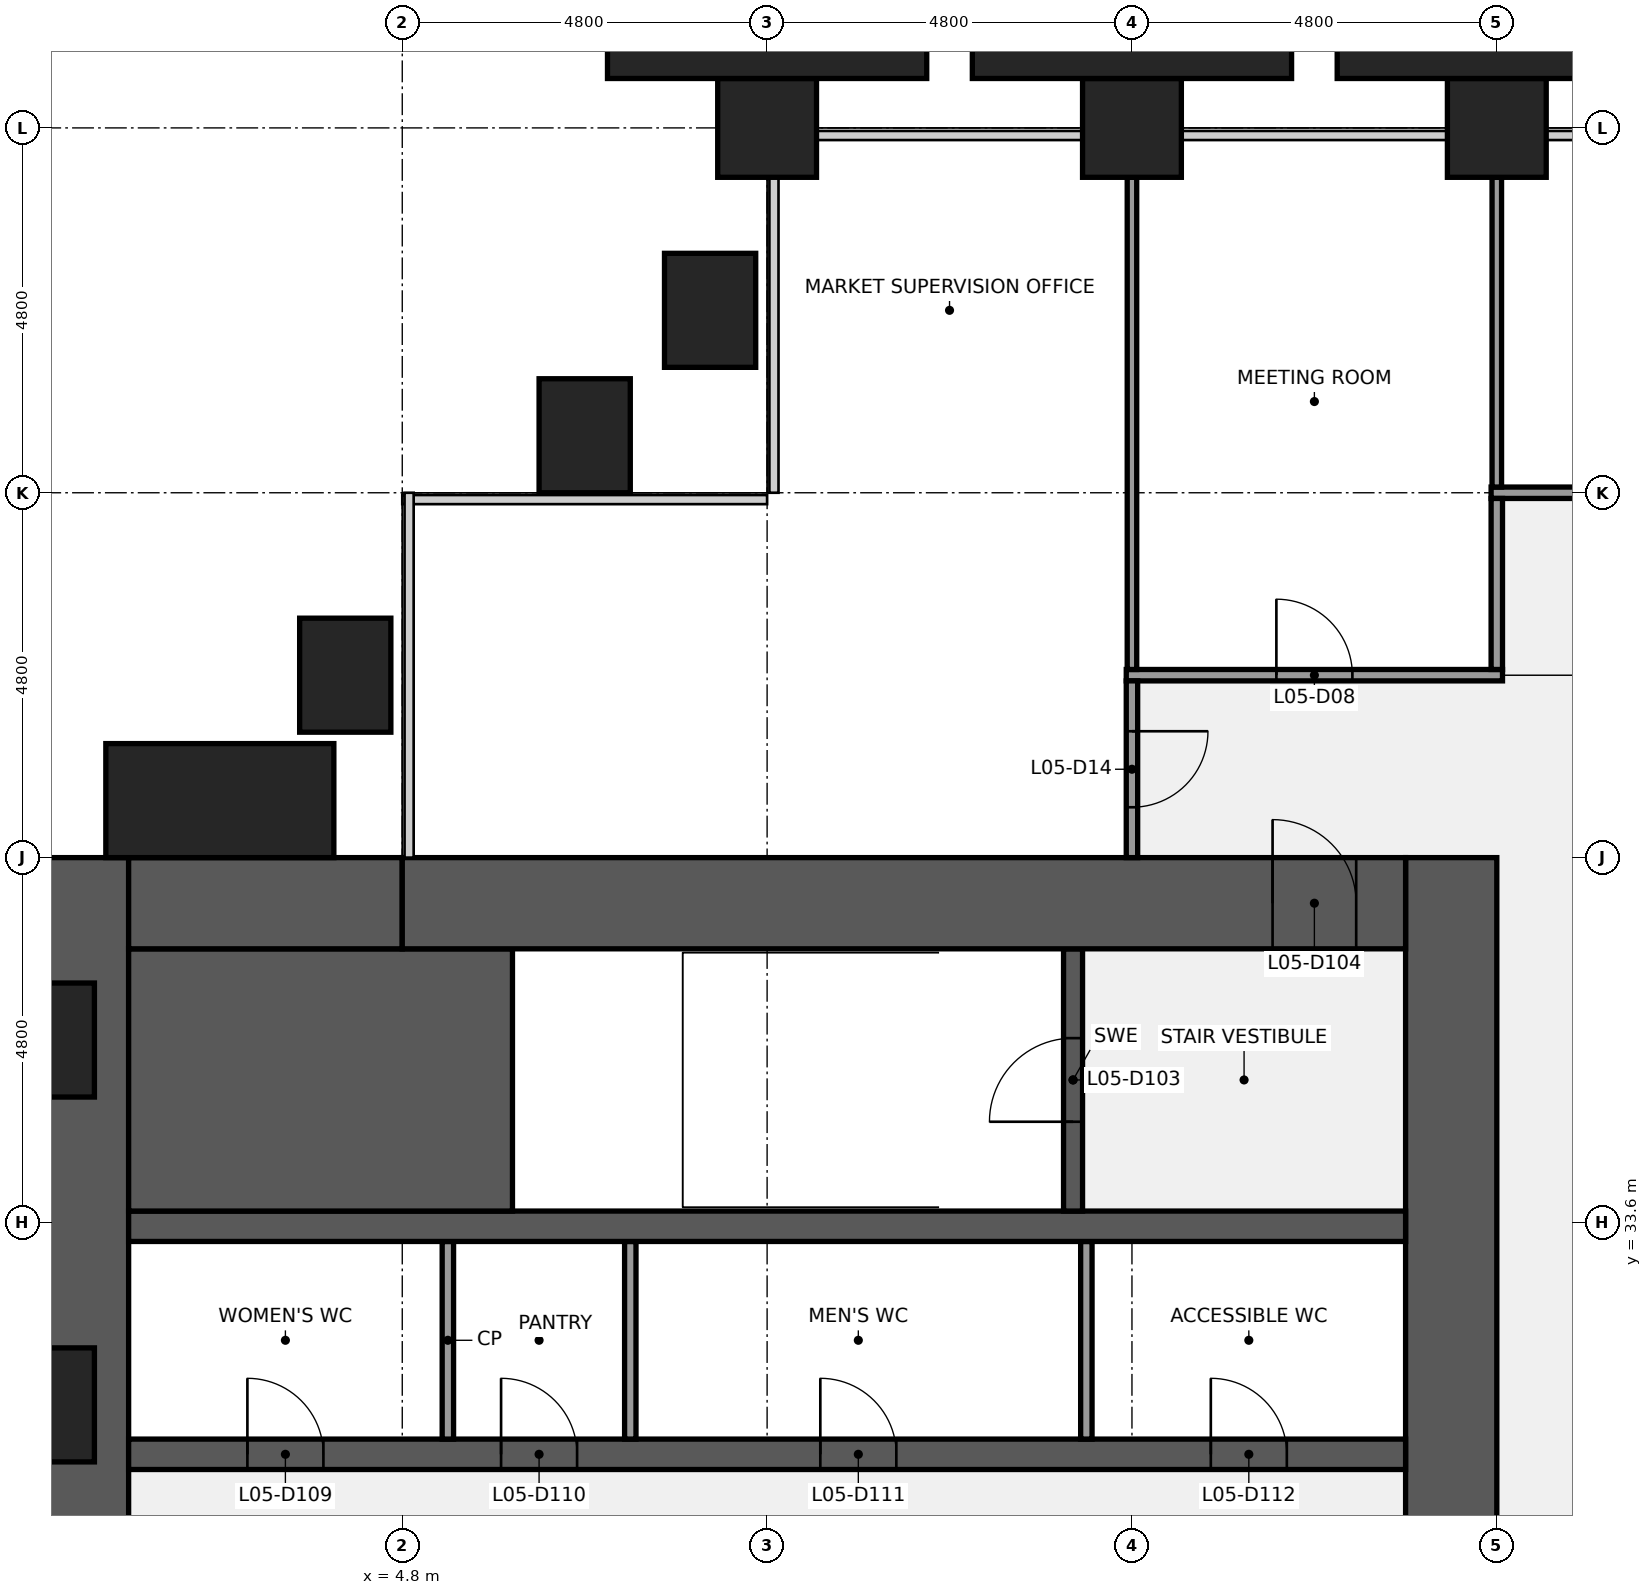
"""IFC4 building model, lengths in metres.
Left out: names, types, materials, properties, quantities, classifications, styles, units other than length and angle.
Written with IfcOpenShell. Run it as: python <this file> out.ifc"""

import sys

from ifc_helpers import new_model, si_unit, direction, frame, frame_2d, origin, origin_2d, place, context, subcontext, project, spatial, rectangle, extrude, element, fill, save


model = new_model("IFC4")
c1 = context("Model", 3, precision=1e-05, world=origin(), true_north=direction((0.0, 1.0)))
c2 = subcontext(c1, "Body", "Model", "MODEL_VIEW")
j1 = project(units=[si_unit("LENGTHUNIT", "METRE"), si_unit("PLANEANGLEUNIT", "RADIAN")], contexts=[c1])
p1 = place(None, origin())
s1 = spatial("IfcSite", under=j1, at=p1, CompositionType="ELEMENT")
p2 = place(p1, origin())
s2 = spatial("IfcBuilding", under=s1, at=p2, CompositionType="ELEMENT")
p3 = place(p2, frame((0.0, 0.0, 30.2)))
s3 = spatial("IfcBuildingStorey", under=s2, at=p3, CompositionType="ELEMENT", Elevation=30.2)
for number, where, z_axis, x_axis in (
    (1, (9.6, 48.0, 0.0), (0.0, 0.0, 1.0), (1.0, 0.0, 0.0)),
    (2, (14.4, 48.0, 0.0), (0.0, 0.0, 1.0), (1.0, 0.0, 0.0)),
    (3, (19.2, 48.0, 0.0), (0.0, 0.0, 1.0), (1.0, 0.0, 0.0)),
):
    element("IfcColumn", number, at=place(p3, frame(where, z_axis=z_axis, x_axis=x_axis)), inside=s3, PredefinedType="COLUMN", context=c2, shape_type="SweptSolid", body=[
        extrude(rectangle(XDim=1.3, YDim=1.3, at=origin_2d()), origin(), (0.0, 0.0, 1.0), 4.4),
    ])
p4 = place(p3, frame((0.6, 9.6, 0.0), z_axis=(0.0, 0.0, 1.0), x_axis=(0.0, 1.0, 0.0)))
e4 = element("IfcWall", 4, at=p4, inside=s3, PredefinedType="SHEAR", context=c2, shape_type="SweptSolid", body=[
    extrude(rectangle(XDim=28.8, YDim=1.2, at=frame_2d((14.4, 0.0))), origin(), (0.0, 0.0, 1.0), 4.24),
])
p5 = place(p4, frame((8.85, 0.0, 0.9)))
e5 = element("IfcOpeningElement", 5, at=p5, cuts=e4, PredefinedType="OPENING", context=c2, shape_type="SweptSolid", body=[
    extrude(rectangle(XDim=1.5, YDim=1.5, at=frame_2d((0.75, 0.75))), frame((0.0, 0.61, 0.0), z_axis=(0.0, -1.0, 0.0), x_axis=(1.0, 0.0, 0.0)), (0.0, 0.0, 1.0), 1.22),
])
p6 = place(p4, frame((18.45, 0.0, 0.9)))
e6 = element("IfcOpeningElement", 6, at=p6, cuts=e4, PredefinedType="OPENING", context=c2, shape_type="SweptSolid", body=[
    extrude(rectangle(XDim=1.5, YDim=1.5, at=frame_2d((0.75, 0.75))), frame((0.0, 0.61, 0.0), z_axis=(0.0, -1.0, 0.0), x_axis=(1.0, 0.0, 0.0)), (0.0, 0.0, 1.0), 1.22),
])
p7 = place(p3, frame((18.6, 38.4, 0.0), z_axis=(0.0, 0.0, 1.0), x_axis=(0.0, -1.0, 0.0)))
e7 = element("IfcWall", 7, at=p7, inside=s3, PredefinedType="SHEAR", context=c2, shape_type="SweptSolid", body=[
    extrude(rectangle(XDim=28.8, YDim=1.2, at=frame_2d((14.4, 0.0))), origin(), (0.0, 0.0, 1.0), 4.24),
])
p8 = place(p7, frame((18.3, 0.0, 0.0)))
e8 = element("IfcOpeningElement", 8, at=p8, cuts=e7, PredefinedType="OPENING", context=c2, shape_type="SweptSolid", body=[
    extrude(rectangle(XDim=1.8, YDim=2.1, at=frame_2d((0.9, 1.05))), frame((0.0, 0.61, 0.0), z_axis=(0.0, -1.0, 0.0), x_axis=(1.0, 0.0, 0.0)), (0.0, 0.0, 1.0), 1.22),
])
p9 = place(p7, frame((8.7, 0.0, 0.0)))
e9 = element("IfcOpeningElement", 9, at=p9, cuts=e7, PredefinedType="OPENING", context=c2, shape_type="SweptSolid", body=[
    extrude(rectangle(XDim=1.8, YDim=2.1, at=frame_2d((0.9, 1.05))), frame((0.0, 0.61, 0.0), z_axis=(0.0, -1.0, 0.0), x_axis=(1.0, 0.0, 0.0)), (0.0, 0.0, 1.0), 1.22),
])
p10 = place(p3, frame((1.2, 30.55, 0.0), z_axis=(0.0, 0.0, 1.0), x_axis=(1.0, 0.0, 0.0)))
e10 = element("IfcWall", 10, at=p10, inside=s3, PredefinedType="SHEAR", context=c2, shape_type="SweptSolid", body=[
    extrude(rectangle(XDim=16.8, YDim=0.4, at=frame_2d((8.4, 0.0))), origin(), (0.0, 0.0, 1.0), 4.24),
])
p11 = place(p10, frame((1.562, 0.0, 0.0)))
e11 = element("IfcOpeningElement", 11, at=p11, cuts=e10, PredefinedType="OPENING", context=c2, shape_type="SweptSolid", body=[
    extrude(rectangle(XDim=1.0, YDim=2.1, at=frame_2d((0.5, 1.05))), frame((0.0, 0.21, 0.0), z_axis=(0.0, -1.0, 0.0), x_axis=(1.0, 0.0, 0.0)), (0.0, 0.0, 1.0), 0.42),
])
p12 = place(p10, frame((4.9, 0.0, 0.0)))
e12 = element("IfcOpeningElement", 12, at=p12, cuts=e10, PredefinedType="OPENING", context=c2, shape_type="SweptSolid", body=[
    extrude(rectangle(XDim=1.0, YDim=2.1, at=frame_2d((0.5, 1.05))), frame((0.0, 0.21, 0.0), z_axis=(0.0, -1.0, 0.0), x_axis=(1.0, 0.0, 0.0)), (0.0, 0.0, 1.0), 0.42),
])
p13 = place(p10, frame((9.1, 0.0, 0.0)))
e13 = element("IfcOpeningElement", 13, at=p13, cuts=e10, PredefinedType="OPENING", context=c2, shape_type="SweptSolid", body=[
    extrude(rectangle(XDim=1.0, YDim=2.1, at=frame_2d((0.5, 1.05))), frame((0.0, 0.21, 0.0), z_axis=(0.0, -1.0, 0.0), x_axis=(1.0, 0.0, 0.0)), (0.0, 0.0, 1.0), 0.42),
])
p14 = place(p10, frame((14.238, 0.0, 0.0)))
e14 = element("IfcOpeningElement", 14, at=p14, cuts=e10, PredefinedType="OPENING", context=c2, shape_type="SweptSolid", body=[
    extrude(rectangle(XDim=1.0, YDim=2.1, at=frame_2d((0.5, 1.05))), frame((0.0, 0.21, 0.0), z_axis=(0.0, -1.0, 0.0), x_axis=(1.0, 0.0, 0.0)), (0.0, 0.0, 1.0), 0.42),
])
for number, where, z_axis, x_axis in (
    (15, (5.4, 30.75, 0.0), (0.0, 0.0, 1.0), (0.0, 1.0, 0.0)),
    (16, (7.8, 30.75, 0.0), (0.0, 0.0, 1.0), (0.0, 1.0, 0.0)),
    (17, (13.8, 30.75, 0.0), (0.0, 0.0, 1.0), (0.0, 1.0, 0.0)),
):
    element("IfcWall", number, at=place(p3, frame(where, z_axis=z_axis, x_axis=x_axis)), inside=s3, PredefinedType="PARTITIONING", context=c2, shape_type="SweptSolid", body=[
        extrude(rectangle(XDim=2.6, YDim=0.15, at=frame_2d((1.3, 0.0))), origin(), (0.0, 0.0, 1.0), 4.24),
    ])
p15 = place(p3, frame((1.2, 33.55, 0.0), z_axis=(0.0, 0.0, 1.0), x_axis=(1.0, 0.0, 0.0)))
e18 = element("IfcWall", 18, at=p15, inside=s3, PredefinedType="SHEAR", context=c2, shape_type="SweptSolid", body=[
    extrude(rectangle(XDim=16.8, YDim=0.4, at=frame_2d((8.4, 0.0))), origin(), (0.0, 0.0, 1.0), 4.24),
])
p16 = place(p3, frame((1.2, 35.475, 0.0), z_axis=(0.0, 0.0, 1.0), x_axis=(1.0, 0.0, 0.0)))
e19 = element("IfcWall", 19, at=p16, inside=s3, PredefinedType="SHEAR", context=c2, shape_type="SweptSolid", body=[
    extrude(rectangle(XDim=5.05, YDim=3.45, at=frame_2d((2.525, 0.0))), origin(), (0.0, 0.0, 1.0), 4.24),
])
p17 = place(p3, frame((13.625, 33.75, 0.0), z_axis=(0.0, 0.0, 1.0), x_axis=(0.0, 1.0, 0.0)))
e20 = element("IfcWall", 20, at=p17, inside=s3, PredefinedType="SHEAR", context=c2, shape_type="SweptSolid", body=[
    extrude(rectangle(XDim=3.45, YDim=0.25, at=frame_2d((1.725, 0.0))), origin(), (0.0, 0.0, 1.0), 4.24),
])
p18 = place(p17, frame((1.175, 0.0, 0.0)))
e21 = element("IfcOpeningElement", 21, at=p18, cuts=e20, PredefinedType="OPENING", context=c2, shape_type="SweptSolid", body=[
    extrude(rectangle(XDim=1.1, YDim=2.1, at=frame_2d((0.55, 1.05))), frame((0.0, 0.135, 0.0), z_axis=(0.0, -1.0, 0.0), x_axis=(1.0, 0.0, 0.0)), (0.0, 0.0, 1.0), 0.27),
])
p19 = place(p3, frame((1.2, 37.8, 0.0), z_axis=(0.0, 0.0, 1.0), x_axis=(1.0, 0.0, 0.0)))
e22 = element("IfcWall", 22, at=p19, inside=s3, PredefinedType="SHEAR", context=c2, shape_type="SweptSolid", body=[
    extrude(rectangle(XDim=3.6, YDim=1.2, at=frame_2d((1.8, 0.0))), origin(), (0.0, 0.0, 1.0), 4.24),
])
p20 = place(p3, frame((4.8, 37.8, 0.0), z_axis=(0.0, 0.0, 1.0), x_axis=(1.0, 0.0, 0.0)))
e23 = element("IfcWall", 23, at=p20, inside=s3, PredefinedType="SHEAR", context=c2, shape_type="SweptSolid", body=[
    extrude(rectangle(XDim=13.2, YDim=1.2, at=frame_2d((6.6, 0.0))), origin(), (0.0, 0.0, 1.0), 4.24),
])
p21 = place(p20, frame((11.45, 0.0, 0.0)))
e24 = element("IfcOpeningElement", 24, at=p21, cuts=e23, PredefinedType="OPENING", context=c2, shape_type="SweptSolid", body=[
    extrude(rectangle(XDim=1.1, YDim=2.1, at=frame_2d((0.55, 1.05))), frame((0.0, 0.61, 0.0), z_axis=(0.0, -1.0, 0.0), x_axis=(1.0, 0.0, 0.0)), (0.0, 0.0, 1.0), 1.22),
])
p22 = place(p3, frame((14.325, 40.8, 0.0), z_axis=(0.0, 0.0, 1.0), x_axis=(1.0, 0.0, 0.0)))
e25 = element("IfcWall", 25, at=p22, inside=s3, PredefinedType="PARTITIONING", context=c2, shape_type="SweptSolid", body=[
    extrude(rectangle(XDim=4.95, YDim=0.15, at=frame_2d((2.475, 0.0))), origin(), (0.0, 0.0, 1.0), 3.25),
])
p23 = place(p22, frame((1.975, 0.0, 0.0)))
e26 = element("IfcOpeningElement", 26, at=p23, cuts=e25, PredefinedType="OPENING", context=c2, shape_type="SweptSolid", body=[
    extrude(rectangle(XDim=1.0, YDim=2.1, at=frame_2d((0.5, 1.05))), frame((0.0, 0.085, 0.0), z_axis=(0.0, -1.0, 0.0), x_axis=(1.0, 0.0, 0.0)), (0.0, 0.0, 1.0), 0.17),
])
p24 = place(p3, frame((19.125, 43.2, 0.0), z_axis=(0.0, 0.0, 1.0), x_axis=(1.0, 0.0, 0.0)))
e27 = element("IfcWall", 27, at=p24, inside=s3, PredefinedType="PARTITIONING", context=c2, shape_type="SweptSolid", body=[
    extrude(rectangle(XDim=19.35, YDim=0.15, at=frame_2d((9.675, 0.0))), origin(), (0.0, 0.0, 1.0), 3.25),
])
p25 = place(p24, frame((9.175, 0.0, 0.0)))
e28 = element("IfcOpeningElement", 28, at=p25, cuts=e27, PredefinedType="OPENING", context=c2, shape_type="SweptSolid", body=[
    extrude(rectangle(XDim=1.0, YDim=2.1, at=frame_2d((0.5, 1.05))), frame((0.0, 0.085, 0.0), z_axis=(0.0, -1.0, 0.0), x_axis=(1.0, 0.0, 0.0)), (0.0, 0.0, 1.0), 0.17),
])
p26 = place(p3, frame((14.4, 40.875, 0.0), z_axis=(0.0, 0.0, 1.0), x_axis=(0.0, 1.0, 0.0)))
e29 = element("IfcWall", 29, at=p26, inside=s3, PredefinedType="PARTITIONING", context=c2, shape_type="SweptSolid", body=[
    extrude(rectangle(XDim=6.475, YDim=0.125, at=frame_2d((3.238, 0.0))), origin(), (0.0, 0.0, 1.0), 3.25),
])
p27 = place(p3, frame((14.4, 38.4, 0.0), z_axis=(0.0, 0.0, 1.0), x_axis=(0.0, 1.0, 0.0)))
e30 = element("IfcWall", 30, at=p27, inside=s3, PredefinedType="PARTITIONING", context=c2, shape_type="SweptSolid", body=[
    extrude(rectangle(XDim=2.325, YDim=0.15, at=frame_2d((1.163, 0.0))), origin(), (0.0, 0.0, 1.0), 3.25),
])
p28 = place(p27, frame((0.663, 0.0, 0.0)))
e31 = element("IfcOpeningElement", 31, at=p28, cuts=e30, PredefinedType="OPENING", context=c2, shape_type="SweptSolid", body=[
    extrude(rectangle(XDim=1.0, YDim=2.1, at=frame_2d((0.5, 1.05))), frame((0.0, 0.085, 0.0), z_axis=(0.0, -1.0, 0.0), x_axis=(1.0, 0.0, 0.0)), (0.0, 0.0, 1.0), 0.17),
])
p29 = place(p3, frame((19.2, 43.275, 0.0), z_axis=(0.0, 0.0, 1.0), x_axis=(0.0, 1.0, 0.0)))
e32 = element("IfcWall", 32, at=p29, inside=s3, PredefinedType="PARTITIONING", context=c2, shape_type="SweptSolid", body=[
    extrude(rectangle(XDim=4.075, YDim=0.125, at=frame_2d((2.038, 0.0))), origin(), (0.0, 0.0, 1.0), 3.25),
])
p30 = place(p3, frame((19.2, 40.875, 0.0), z_axis=(0.0, 0.0, 1.0), x_axis=(0.0, 1.0, 0.0)))
e33 = element("IfcWall", 33, at=p30, inside=s3, PredefinedType="PARTITIONING", context=c2, shape_type="SweptSolid", body=[
    extrude(rectangle(XDim=2.25, YDim=0.15, at=frame_2d((1.125, 0.0))), origin(), (0.0, 0.0, 1.0), 3.25),
])
for number, where, z_axis, x_axis in (
    (34, (8.85, 45.6, 0.0), (0.0, 0.0, 1.0), (0.0, 1.0, 0.0)),
    (35, (7.2, 43.95, 0.0), (0.0, 0.0, 1.0), (1.0, 0.0, 0.0)),
    (36, (4.05, 40.8, 0.0), (0.0, 0.0, 1.0), (0.0, 1.0, 0.0)),
):
    element("IfcColumn", number, at=place(p3, frame(where, z_axis=z_axis, x_axis=x_axis)), inside=s3, PredefinedType="PILASTER", context=c2, shape_type="SweptSolid", body=[
        extrude(rectangle(XDim=1.2, YDim=1.5, at=origin_2d()), origin(), (0.0, 0.0, 1.0), 4.1),
    ])
p31 = place(p3, frame((2.4, 39.15, 0.0), z_axis=(0.0, 0.0, 1.0), x_axis=(1.0, 0.0, 0.0)))
e37 = element("IfcColumn", 37, at=p31, inside=s3, PredefinedType="PILASTER", context=c2, shape_type="SweptSolid", body=[
    extrude(rectangle(XDim=3.0, YDim=1.5, at=origin_2d()), origin(), (0.0, 0.0, 1.0), 4.4),
])
for number, where, z_axis, x_axis in (
    (38, (9.6, 49.075, 0.0), (0.0, 0.0, 1.0), (1.0, 0.0, 0.0)),
    (39, (14.4, 49.075, 0.0), (0.0, 0.0, 1.0), (1.0, 0.0, 0.0)),
    (40, (19.2, 49.075, 0.0), (0.0, 0.0, 1.0), (1.0, 0.0, 0.0)),
):
    element("IfcColumn", number, at=place(p3, frame(where, z_axis=z_axis, x_axis=x_axis)), inside=s3, PredefinedType="PILASTER", context=c2, shape_type="SweptSolid", body=[
        extrude(rectangle(XDim=4.2, YDim=0.85, at=origin_2d()), origin(), (0.0, 0.0, 1.0), 4.4),
    ])
p32 = place(p18, origin())
e41 = element("IfcDoor", 41, at=p32, inside=s3, OperationType="SINGLE_SWING_LEFT", PredefinedType="DOOR", context=c2, shape_type="SweptSolid", body=[
    extrude(rectangle(XDim=1.1, YDim=2.1, at=frame_2d((0.55, 1.05))), frame((0.0, 0.025, 0.0), z_axis=(0.0, -1.0, 0.0), x_axis=(1.0, 0.0, 0.0)), (0.0, 0.0, 1.0), 0.05),
])
fill(e21, e41)
p33 = place(p21, origin())
e42 = element("IfcDoor", 42, at=p33, inside=s3, OperationType="SINGLE_SWING_LEFT", PredefinedType="DOOR", context=c2, shape_type="SweptSolid", body=[
    extrude(rectangle(XDim=1.1, YDim=2.1, at=frame_2d((0.55, 1.05))), frame((0.0, 0.025, 0.0), z_axis=(0.0, -1.0, 0.0), x_axis=(1.0, 0.0, 0.0)), (0.0, 0.0, 1.0), 0.05),
])
fill(e24, e42)
p34 = place(p11, origin())
e43 = element("IfcDoor", 43, at=p34, inside=s3, OperationType="SINGLE_SWING_LEFT", PredefinedType="DOOR", context=c2, shape_type="SweptSolid", body=[
    extrude(rectangle(XDim=1.0, YDim=2.1, at=frame_2d((0.5, 1.05))), frame((0.0, 0.025, 0.0), z_axis=(0.0, -1.0, 0.0), x_axis=(1.0, 0.0, 0.0)), (0.0, 0.0, 1.0), 0.05),
])
fill(e11, e43)
p35 = place(p12, origin())
e44 = element("IfcDoor", 44, at=p35, inside=s3, OperationType="SINGLE_SWING_LEFT", PredefinedType="DOOR", context=c2, shape_type="SweptSolid", body=[
    extrude(rectangle(XDim=1.0, YDim=2.1, at=frame_2d((0.5, 1.05))), frame((0.0, 0.025, 0.0), z_axis=(0.0, -1.0, 0.0), x_axis=(1.0, 0.0, 0.0)), (0.0, 0.0, 1.0), 0.05),
])
fill(e12, e44)
p36 = place(p13, origin())
e45 = element("IfcDoor", 45, at=p36, inside=s3, OperationType="SINGLE_SWING_LEFT", PredefinedType="DOOR", context=c2, shape_type="SweptSolid", body=[
    extrude(rectangle(XDim=1.0, YDim=2.1, at=frame_2d((0.5, 1.05))), frame((0.0, 0.025, 0.0), z_axis=(0.0, -1.0, 0.0), x_axis=(1.0, 0.0, 0.0)), (0.0, 0.0, 1.0), 0.05),
])
fill(e13, e45)
p37 = place(p14, origin())
e46 = element("IfcDoor", 46, at=p37, inside=s3, OperationType="SINGLE_SWING_LEFT", PredefinedType="DOOR", context=c2, shape_type="SweptSolid", body=[
    extrude(rectangle(XDim=1.0, YDim=2.1, at=frame_2d((0.5, 1.05))), frame((0.0, 0.025, 0.0), z_axis=(0.0, -1.0, 0.0), x_axis=(1.0, 0.0, 0.0)), (0.0, 0.0, 1.0), 0.05),
])
fill(e14, e46)
p38 = place(p23, origin())
e47 = element("IfcDoor", 47, at=p38, inside=s3, OperationType="SINGLE_SWING_LEFT", PredefinedType="DOOR", context=c2, shape_type="SweptSolid", body=[
    extrude(rectangle(XDim=1.0, YDim=2.1, at=frame_2d((0.5, 1.05))), frame((0.0, 0.025, 0.0), z_axis=(0.0, -1.0, 0.0), x_axis=(1.0, 0.0, 0.0)), (0.0, 0.0, 1.0), 0.05),
])
fill(e26, e47)
p39 = place(p28, origin())
e48 = element("IfcDoor", 48, at=p39, inside=s3, OperationType="SINGLE_SWING_RIGHT", PredefinedType="DOOR", context=c2, shape_type="SweptSolid", body=[
    extrude(rectangle(XDim=1.0, YDim=2.1, at=frame_2d((0.5, 1.05))), frame((0.0, 0.025, 0.0), z_axis=(0.0, -1.0, 0.0), x_axis=(1.0, 0.0, 0.0)), (0.0, 0.0, 1.0), 0.05),
])
fill(e31, e48)
save(model, sys.argv[1])
